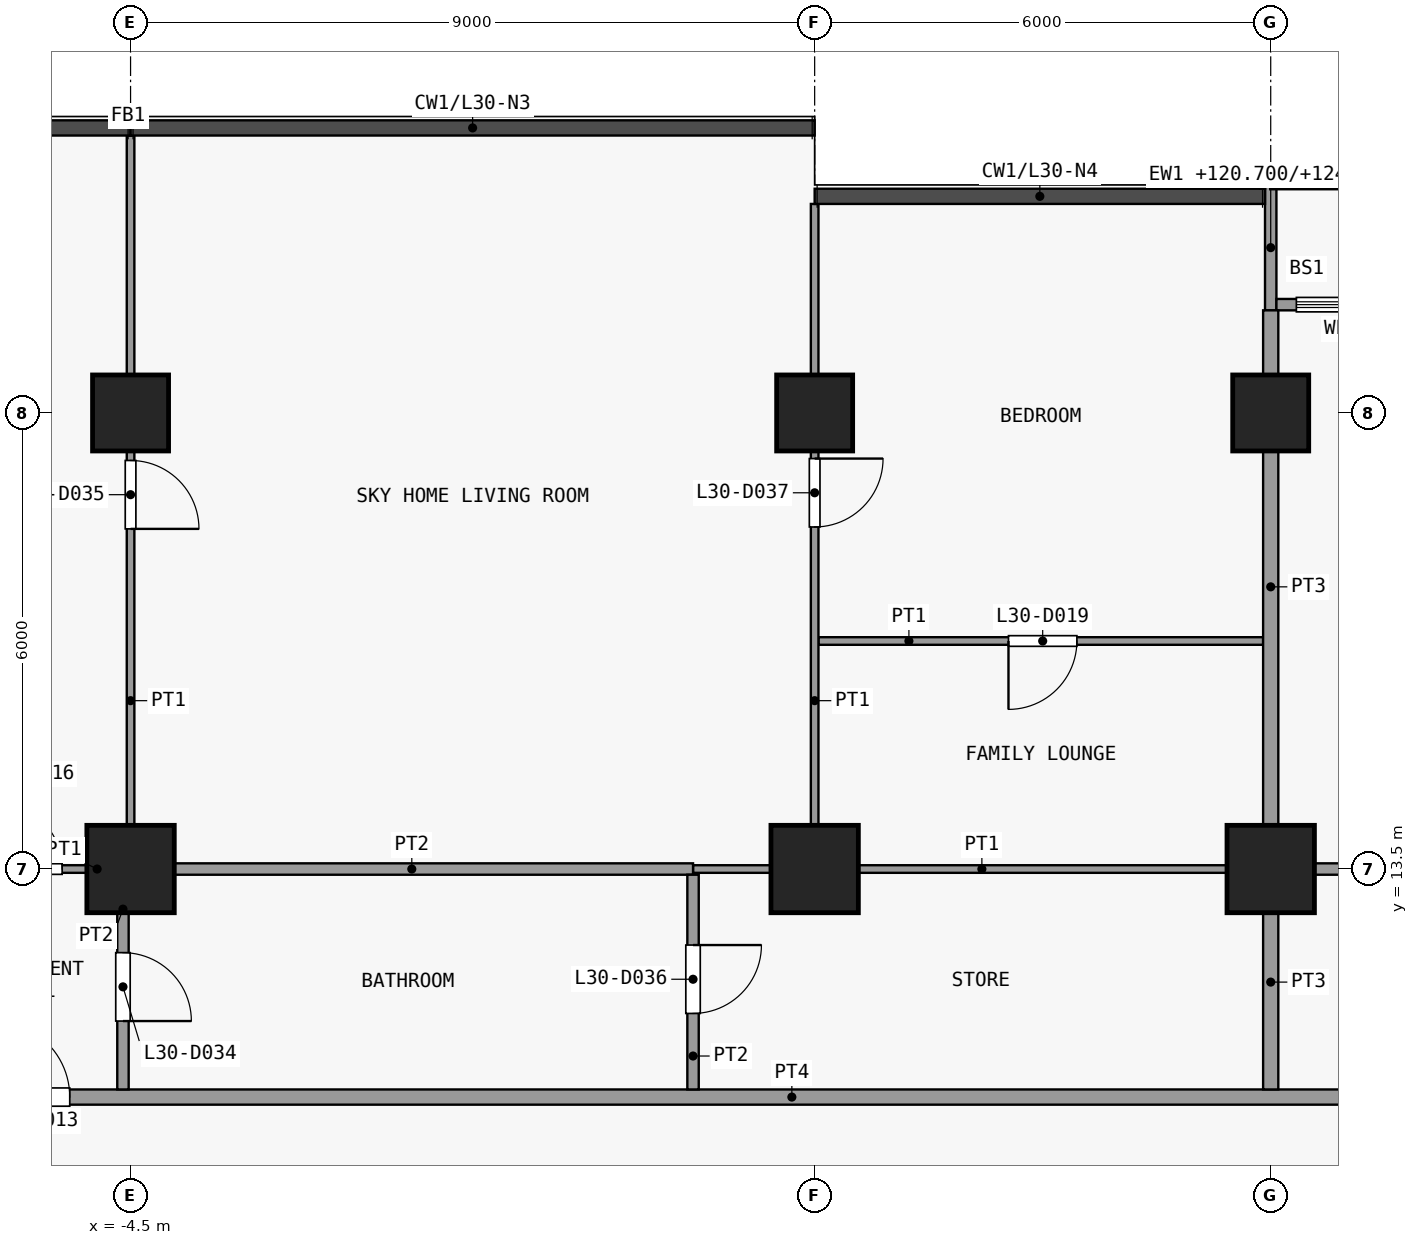
"""IFC4 building model, lengths in metres.
Left out: names, types, materials, properties, quantities, classifications, styles, units other than length and angle.
Written with IfcOpenShell. Run it as: python <this file> out.ifc"""

import sys

from ifc_helpers import new_model, si_unit, direction, frame, frame_2d, origin, origin_2d, place, context, subcontext, project, spatial, rectangle, extrude, element, fill, save


model = new_model("IFC4")
c1 = context("Model", 3, precision=1e-05, world=origin(), true_north=direction((0.0, 1.0)))
c2 = subcontext(c1, "Body", "Model", "MODEL_VIEW")
j1 = project(units=[si_unit("LENGTHUNIT", "METRE"), si_unit("PLANEANGLEUNIT", "RADIAN")], contexts=[c1])
p1 = place(None, origin())
s1 = spatial("IfcSite", under=j1, at=p1, CompositionType="ELEMENT")
p2 = place(p1, origin())
s2 = spatial("IfcBuilding", under=s1, at=p2, CompositionType="ELEMENT")
p3 = place(p2, frame((0.0, 0.0, 120.7)))
s3 = spatial("IfcBuildingStorey", under=s2, at=p3, CompositionType="ELEMENT", Elevation=120.7)
p4 = place(p3, frame((-4.5, 13.5, 0.0), z_axis=(0.0, 0.0, 1.0), x_axis=(1.0, 0.0, 0.0)))
e1 = element("IfcColumn", 1, at=p4, inside=s3, PredefinedType="COLUMN", context=c2, shape_type="SweptSolid", body=[
    extrude(rectangle(XDim=1.15, YDim=1.15, at=origin_2d()), origin(), (0.0, 0.0, 1.0), 3.6),
])
p5 = place(p3, frame((-4.5, 19.5, 0.0), z_axis=(0.0, 0.0, 1.0), x_axis=(1.0, 0.0, 0.0)))
e2 = element("IfcColumn", 2, at=p5, inside=s3, PredefinedType="COLUMN", context=c2, shape_type="SweptSolid", body=[
    extrude(rectangle(XDim=1.0, YDim=1.0, at=origin_2d()), origin(), (0.0, 0.0, 1.0), 3.6),
])
p6 = place(p3, frame((4.5, 13.5, 0.0), z_axis=(0.0, 0.0, 1.0), x_axis=(1.0, 0.0, 0.0)))
e3 = element("IfcColumn", 3, at=p6, inside=s3, PredefinedType="COLUMN", context=c2, shape_type="SweptSolid", body=[
    extrude(rectangle(XDim=1.15, YDim=1.15, at=origin_2d()), origin(), (0.0, 0.0, 1.0), 3.6),
])
p7 = place(p3, frame((4.5, 19.5, 0.0), z_axis=(0.0, 0.0, 1.0), x_axis=(1.0, 0.0, 0.0)))
e4 = element("IfcColumn", 4, at=p7, inside=s3, PredefinedType="COLUMN", context=c2, shape_type="SweptSolid", body=[
    extrude(rectangle(XDim=1.0, YDim=1.0, at=origin_2d()), origin(), (0.0, 0.0, 1.0), 3.6),
])
p8 = place(p3, frame((10.5, 13.5, 0.0), z_axis=(0.0, 0.0, 1.0), x_axis=(1.0, 0.0, 0.0)))
e5 = element("IfcColumn", 5, at=p8, inside=s3, PredefinedType="COLUMN", context=c2, shape_type="SweptSolid", body=[
    extrude(rectangle(XDim=1.15, YDim=1.15, at=origin_2d()), origin(), (0.0, 0.0, 1.0), 3.6),
])
p9 = place(p3, frame((10.5, 19.5, 0.0), z_axis=(0.0, 0.0, 1.0), x_axis=(1.0, 0.0, 0.0)))
e6 = element("IfcColumn", 6, at=p9, inside=s3, PredefinedType="COLUMN", context=c2, shape_type="SweptSolid", body=[
    extrude(rectangle(XDim=1.0, YDim=1.0, at=origin_2d()), origin(), (0.0, 0.0, 1.0), 3.6),
])
p10 = place(p3, frame((10.5, 20.85, 0.0), z_axis=(0.0, 0.0, 1.0), x_axis=(0.0, 1.0, 0.0)))
e7 = element("IfcWall", 7, at=p10, inside=s3, PredefinedType="SOLIDWALL", context=c2, shape_type="SweptSolid", body=[
    extrude(rectangle(XDim=1.65, YDim=0.15, at=frame_2d((0.825, 0.0))), origin(), (0.0, 0.0, 1.0), 3.4),
])
p11 = place(p3, frame((10.575, 20.925, 0.0), z_axis=(0.0, 0.0, 1.0), x_axis=(1.0, 0.0, 0.0)))
e8 = element("IfcWall", 8, at=p11, inside=s3, PredefinedType="SOLIDWALL", context=c2, shape_type="SweptSolid", body=[
    extrude(rectangle(XDim=5.85, YDim=0.15, at=frame_2d((2.925, 0.0))), origin(), (0.0, 0.0, 1.0), 3.3),
])
p12 = place(p11, frame((2.325, 0.0, 0.0)))
e9 = element("IfcOpeningElement", 9, at=p12, cuts=e8, PredefinedType="OPENING", context=c2, shape_type="SweptSolid", body=[
    extrude(rectangle(XDim=1.2, YDim=2.4, at=frame_2d((0.6, 1.2))), frame((0.0, 0.085, 0.0), z_axis=(0.0, -1.0, 0.0), x_axis=(1.0, 0.0, 0.0)), (0.0, 0.0, 1.0), 0.17),
])
p13 = place(p11, frame((0.262, 0.0, 0.9)))
e10 = element("IfcOpeningElement", 10, at=p13, cuts=e8, PredefinedType="OPENING", context=c2, shape_type="SweptSolid", body=[
    extrude(rectangle(XDim=1.8, YDim=2.1, at=frame_2d((0.9, 1.05))), frame((0.0, 0.085, 0.0), z_axis=(0.0, -1.0, 0.0), x_axis=(1.0, 0.0, 0.0)), (0.0, 0.0, 1.0), 0.17),
])
p14 = place(p11, frame((3.788, 0.0, 0.9)))
e11 = element("IfcOpeningElement", 11, at=p14, cuts=e8, PredefinedType="OPENING", context=c2, shape_type="SweptSolid", body=[
    extrude(rectangle(XDim=1.8, YDim=2.1, at=frame_2d((0.9, 1.05))), frame((0.0, 0.085, 0.0), z_axis=(0.0, -1.0, 0.0), x_axis=(1.0, 0.0, 0.0)), (0.0, 0.0, 1.0), 0.17),
])
p15 = place(p3, frame((-23.85, 10.5, 0.0), z_axis=(0.0, 0.0, 1.0), x_axis=(1.0, 0.0, 0.0)))
e12 = element("IfcWall", 12, at=p15, inside=s3, PredefinedType="PARTITIONING", context=c2, shape_type="SweptSolid", body=[
    extrude(rectangle(XDim=50.1, YDim=0.2, at=frame_2d((25.05, 0.0))), origin(), (0.0, 0.0, 1.0), 3.3),
])
p16 = place(p15, frame((3.05, 0.0, 0.0)))
e13 = element("IfcOpeningElement", 13, at=p16, cuts=e12, PredefinedType="OPENING", context=c2, shape_type="SweptSolid", body=[
    extrude(rectangle(XDim=1.0, YDim=2.1, at=frame_2d((0.5, 1.05))), frame((0.0, 0.11, 0.0), z_axis=(0.0, -1.0, 0.0), x_axis=(1.0, 0.0, 0.0)), (0.0, 0.0, 1.0), 0.22),
])
p17 = place(p15, frame((17.55, 0.0, 0.0)))
e14 = element("IfcOpeningElement", 14, at=p17, cuts=e12, PredefinedType="OPENING", context=c2, shape_type="SweptSolid", body=[
    extrude(rectangle(XDim=1.0, YDim=2.1, at=frame_2d((0.5, 1.05))), frame((0.0, 0.11, 0.0), z_axis=(0.0, -1.0, 0.0), x_axis=(1.0, 0.0, 0.0)), (0.0, 0.0, 1.0), 0.22),
])
p18 = place(p15, frame((37.55, 0.0, 0.0)))
e15 = element("IfcOpeningElement", 15, at=p18, cuts=e12, PredefinedType="OPENING", context=c2, shape_type="SweptSolid", body=[
    extrude(rectangle(XDim=1.0, YDim=2.1, at=frame_2d((0.5, 1.05))), frame((0.0, 0.11, 0.0), z_axis=(0.0, -1.0, 0.0), x_axis=(1.0, 0.0, 0.0)), (0.0, 0.0, 1.0), 0.22),
])
p19 = place(p3, frame((-7.0, 13.5, 0.0), z_axis=(0.0, 0.0, 1.0), x_axis=(1.0, 0.0, 0.0)))
e16 = element("IfcWall", 16, at=p19, inside=s3, PredefinedType="PARTITIONING", context=c2, shape_type="SweptSolid", body=[
    extrude(rectangle(XDim=2.4, YDim=0.1, at=frame_2d((1.2, 0.0))), origin(), (0.0, 0.0, 1.0), 3.3),
])
p20 = place(p19, frame((0.7, 0.0, 0.0)))
e17 = element("IfcOpeningElement", 17, at=p20, cuts=e16, PredefinedType="OPENING", context=c2, shape_type="SweptSolid", body=[
    extrude(rectangle(XDim=0.9, YDim=2.1, at=frame_2d((0.45, 1.05))), frame((0.0, 0.06, 0.0), z_axis=(0.0, -1.0, 0.0), x_axis=(1.0, 0.0, 0.0)), (0.0, 0.0, 1.0), 0.12),
])
p21 = place(p3, frame((2.9, 13.5, 0.0), z_axis=(0.0, 0.0, 1.0), x_axis=(1.0, 0.0, 0.0)))
e18 = element("IfcWall", 18, at=p21, inside=s3, PredefinedType="PARTITIONING", context=c2, shape_type="SweptSolid", body=[
    extrude(rectangle(XDim=7.6, YDim=0.1, at=frame_2d((3.8, 0.0))), origin(), (0.0, 0.0, 1.0), 3.3),
])
p22 = place(p3, frame((-4.5, 13.5, 0.0), z_axis=(0.0, 0.0, 1.0), x_axis=(1.0, 0.0, 0.0)))
e19 = element("IfcWall", 19, at=p22, inside=s3, PredefinedType="PARTITIONING", context=c2, shape_type="SweptSolid", body=[
    extrude(rectangle(XDim=7.4, YDim=0.15, at=frame_2d((3.7, 0.0))), origin(), (0.0, 0.0, 1.0), 3.3),
])
p23 = place(p3, frame((10.5, 13.5, 0.0), z_axis=(0.0, 0.0, 1.0), x_axis=(1.0, 0.0, 0.0)))
e20 = element("IfcWall", 20, at=p23, inside=s3, PredefinedType="PARTITIONING", context=c2, shape_type="SweptSolid", body=[
    extrude(rectangle(XDim=2.5, YDim=0.15, at=frame_2d((1.25, 0.0))), origin(), (0.0, 0.0, 1.0), 3.3),
])
p24 = place(p3, frame((4.55, 16.5, 0.0), z_axis=(0.0, 0.0, 1.0), x_axis=(1.0, 0.0, 0.0)))
e21 = element("IfcWall", 21, at=p24, inside=s3, PredefinedType="PARTITIONING", context=c2, shape_type="SweptSolid", body=[
    extrude(rectangle(XDim=5.85, YDim=0.1, at=frame_2d((2.925, 0.0))), origin(), (0.0, 0.0, 1.0), 3.3),
])
p25 = place(p24, frame((2.5, 0.0, 0.0)))
e22 = element("IfcOpeningElement", 22, at=p25, cuts=e21, PredefinedType="OPENING", context=c2, shape_type="SweptSolid", body=[
    extrude(rectangle(XDim=0.9, YDim=2.1, at=frame_2d((0.45, 1.05))), frame((0.0, 0.06, 0.0), z_axis=(0.0, -1.0, 0.0), x_axis=(1.0, 0.0, 0.0)), (0.0, 0.0, 1.0), 0.12),
])
p26 = place(p3, frame((-4.6, 10.6, 0.0), z_axis=(0.0, 0.0, 1.0), x_axis=(0.0, 1.0, 0.0)))
e23 = element("IfcWall", 23, at=p26, inside=s3, PredefinedType="PARTITIONING", context=c2, shape_type="SweptSolid", body=[
    extrude(rectangle(XDim=2.825, YDim=0.15, at=frame_2d((1.413, 0.0))), origin(), (0.0, 0.0, 1.0), 3.3),
])
p27 = place(p26, frame((0.9, 0.0, 0.0)))
e24 = element("IfcOpeningElement", 24, at=p27, cuts=e23, PredefinedType="OPENING", context=c2, shape_type="SweptSolid", body=[
    extrude(rectangle(XDim=0.9, YDim=2.1, at=frame_2d((0.45, 1.05))), frame((0.0, 0.085, 0.0), z_axis=(0.0, -1.0, 0.0), x_axis=(1.0, 0.0, 0.0)), (0.0, 0.0, 1.0), 0.17),
])
p28 = place(p3, frame((-4.5, 13.575, 0.0), z_axis=(0.0, 0.0, 1.0), x_axis=(0.0, 1.0, 0.0)))
e25 = element("IfcWall", 25, at=p28, inside=s3, PredefinedType="PARTITIONING", context=c2, shape_type="SweptSolid", body=[
    extrude(rectangle(XDim=9.575, YDim=0.1, at=frame_2d((4.788, 0.0))), origin(), (0.0, 0.0, 1.0), 3.3),
])
p29 = place(p28, frame((4.4, 0.0, 0.0)))
e26 = element("IfcOpeningElement", 26, at=p29, cuts=e25, PredefinedType="OPENING", context=c2, shape_type="SweptSolid", body=[
    extrude(rectangle(XDim=0.9, YDim=2.1, at=frame_2d((0.45, 1.05))), frame((0.0, 0.06, 0.0), z_axis=(0.0, -1.0, 0.0), x_axis=(1.0, 0.0, 0.0)), (0.0, 0.0, 1.0), 0.12),
])
p30 = place(p3, frame((2.9, 10.6, 0.0), z_axis=(0.0, 0.0, 1.0), x_axis=(0.0, 1.0, 0.0)))
e27 = element("IfcWall", 27, at=p30, inside=s3, PredefinedType="PARTITIONING", context=c2, shape_type="SweptSolid", body=[
    extrude(rectangle(XDim=2.825, YDim=0.15, at=frame_2d((1.413, 0.0))), origin(), (0.0, 0.0, 1.0), 3.3),
])
p31 = place(p30, frame((1.0, 0.0, 0.0)))
e28 = element("IfcOpeningElement", 28, at=p31, cuts=e27, PredefinedType="OPENING", context=c2, shape_type="SweptSolid", body=[
    extrude(rectangle(XDim=0.9, YDim=2.1, at=frame_2d((0.45, 1.05))), frame((0.0, 0.085, 0.0), z_axis=(0.0, -1.0, 0.0), x_axis=(1.0, 0.0, 0.0)), (0.0, 0.0, 1.0), 0.17),
])
p32 = place(p3, frame((4.5, 13.55, 0.0), z_axis=(0.0, 0.0, 1.0), x_axis=(0.0, 1.0, 0.0)))
e29 = element("IfcWall", 29, at=p32, inside=s3, PredefinedType="PARTITIONING", context=c2, shape_type="SweptSolid", body=[
    extrude(rectangle(XDim=8.7, YDim=0.1, at=frame_2d((4.35, 0.0))), origin(), (0.0, 0.0, 1.0), 3.3),
])
p33 = place(p32, frame((4.45, 0.0, 0.0)))
e30 = element("IfcOpeningElement", 30, at=p33, cuts=e29, PredefinedType="OPENING", context=c2, shape_type="SweptSolid", body=[
    extrude(rectangle(XDim=0.9, YDim=2.1, at=frame_2d((0.45, 1.05))), frame((0.0, 0.06, 0.0), z_axis=(0.0, -1.0, 0.0), x_axis=(1.0, 0.0, 0.0)), (0.0, 0.0, 1.0), 0.12),
])
p34 = place(p3, frame((10.5, 10.6, 0.0), z_axis=(0.0, 0.0, 1.0), x_axis=(0.0, 1.0, 0.0)))
e31 = element("IfcWall", 31, at=p34, inside=s3, PredefinedType="PARTITIONING", context=c2, shape_type="SweptSolid", body=[
    extrude(rectangle(XDim=2.825, YDim=0.2, at=frame_2d((1.413, 0.0))), origin(), (0.0, 0.0, 1.0), 3.3),
])
p35 = place(p3, frame((10.5, 13.575, 0.0), z_axis=(0.0, 0.0, 1.0), x_axis=(0.0, 1.0, 0.0)))
e32 = element("IfcWall", 32, at=p35, inside=s3, PredefinedType="PARTITIONING", context=c2, shape_type="SweptSolid", body=[
    extrude(rectangle(XDim=7.275, YDim=0.2, at=frame_2d((3.638, 0.0))), origin(), (0.0, 0.0, 1.0), 3.3),
])
p36 = place(p13, origin())
e33 = element("IfcWindow", 33, at=p36, inside=s3, PartitioningType="SINGLE_PANEL", PredefinedType="WINDOW", context=c2, shape_type="SweptSolid", body=[
    extrude(rectangle(XDim=1.8, YDim=2.1, at=frame_2d((0.9, 1.05))), frame((0.0, 0.03, 0.0), z_axis=(0.0, -1.0, 0.0), x_axis=(1.0, 0.0, 0.0)), (0.0, 0.0, 1.0), 0.06),
])
fill(e10, e33)
p37 = place(p17, origin())
e34 = element("IfcDoor", 34, at=p37, inside=s3, OperationType="SINGLE_SWING_RIGHT", PredefinedType="DOOR", context=c2, shape_type="SweptSolid", body=[
    extrude(rectangle(XDim=1.0, YDim=2.1, at=frame_2d((0.5, 1.05))), frame((0.0, 0.025, 0.0), z_axis=(0.0, -1.0, 0.0), x_axis=(1.0, 0.0, 0.0)), (0.0, 0.0, 1.0), 0.05),
])
fill(e14, e34)
p38 = place(p20, origin())
e35 = element("IfcDoor", 35, at=p38, inside=s3, OperationType="SINGLE_SWING_RIGHT", PredefinedType="DOOR", context=c2, shape_type="SweptSolid", body=[
    extrude(rectangle(XDim=0.9, YDim=2.1, at=frame_2d((0.45, 1.05))), frame((0.0, 0.025, 0.0), z_axis=(0.0, -1.0, 0.0), x_axis=(1.0, 0.0, 0.0)), (0.0, 0.0, 1.0), 0.05),
])
fill(e17, e35)
p39 = place(p25, origin())
e36 = element("IfcDoor", 36, at=p39, inside=s3, OperationType="SINGLE_SWING_LEFT", PredefinedType="DOOR", context=c2, shape_type="SweptSolid", body=[
    extrude(rectangle(XDim=0.9, YDim=2.1, at=frame_2d((0.45, 1.05))), frame((0.0, 0.025, 0.0), z_axis=(0.0, -1.0, 0.0), x_axis=(1.0, 0.0, 0.0)), (0.0, 0.0, 1.0), 0.05),
])
fill(e22, e36)
p40 = place(p27, origin())
e37 = element("IfcDoor", 37, at=p40, inside=s3, OperationType="SINGLE_SWING_LEFT", PredefinedType="DOOR", context=c2, shape_type="SweptSolid", body=[
    extrude(rectangle(XDim=0.9, YDim=2.1, at=frame_2d((0.45, 1.05))), frame((0.0, 0.025, 0.0), z_axis=(0.0, -1.0, 0.0), x_axis=(1.0, 0.0, 0.0)), (0.0, 0.0, 1.0), 0.05),
])
fill(e24, e37)
p41 = place(p29, origin())
e38 = element("IfcDoor", 38, at=p41, inside=s3, OperationType="SINGLE_SWING_LEFT", PredefinedType="DOOR", context=c2, shape_type="SweptSolid", body=[
    extrude(rectangle(XDim=0.9, YDim=2.1, at=frame_2d((0.45, 1.05))), frame((0.0, 0.025, 0.0), z_axis=(0.0, -1.0, 0.0), x_axis=(1.0, 0.0, 0.0)), (0.0, 0.0, 1.0), 0.05),
])
fill(e26, e38)
p42 = place(p31, origin())
e39 = element("IfcDoor", 39, at=p42, inside=s3, OperationType="SINGLE_SWING_RIGHT", PredefinedType="DOOR", context=c2, shape_type="SweptSolid", body=[
    extrude(rectangle(XDim=0.9, YDim=2.1, at=frame_2d((0.45, 1.05))), frame((0.0, 0.025, 0.0), z_axis=(0.0, -1.0, 0.0), x_axis=(1.0, 0.0, 0.0)), (0.0, 0.0, 1.0), 0.05),
])
fill(e28, e39)
p43 = place(p33, origin())
e40 = element("IfcDoor", 40, at=p43, inside=s3, OperationType="SINGLE_SWING_RIGHT", PredefinedType="DOOR", context=c2, shape_type="SweptSolid", body=[
    extrude(rectangle(XDim=0.9, YDim=2.1, at=frame_2d((0.45, 1.05))), frame((0.0, 0.025, 0.0), z_axis=(0.0, -1.0, 0.0), x_axis=(1.0, 0.0, 0.0)), (0.0, 0.0, 1.0), 0.05),
])
fill(e30, e40)
save(model, sys.argv[1])
